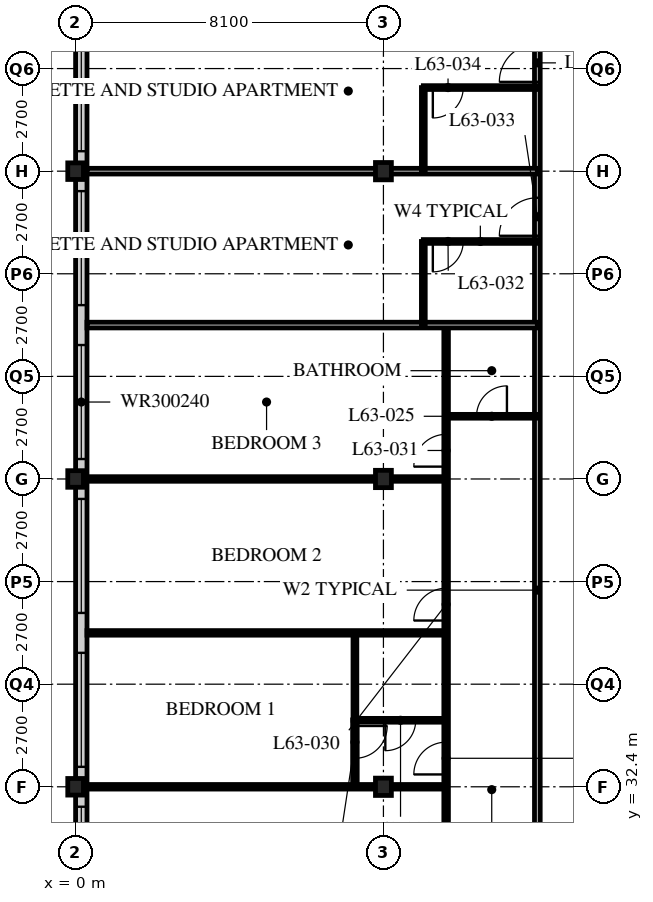
"""IFC4 building model, lengths in metres.
Left out: names, types, materials, properties, quantities, classifications, styles, units other than length and angle.
Written with IfcOpenShell. Run it as: python <this file> out.ifc"""

import sys

from ifc_helpers import new_model, si_unit, direction, frame, frame_2d, origin, origin_2d, place, context, subcontext, project, spatial, rectangle, i_section, extrude, element, fill, save


model = new_model("IFC4")
c1 = context("Model", 3, precision=1e-05, world=origin(), true_north=direction((0.0, 1.0)))
c2 = subcontext(c1, "Body", "Model", "MODEL_VIEW")
j1 = project(units=[si_unit("LENGTHUNIT", "METRE"), si_unit("PLANEANGLEUNIT", "RADIAN")], contexts=[c1])
p1 = place(None, origin())
s1 = spatial("IfcSite", under=j1, at=p1, CompositionType="ELEMENT")
p2 = place(p1, origin())
s2 = spatial("IfcBuilding", under=s1, at=p2, CompositionType="ELEMENT")
p3 = place(p2, frame((0.0, 0.0, 246.3)))
s3 = spatial("IfcBuildingStorey", under=s2, at=p3, CompositionType="ELEMENT", Elevation=246.3)
for number, where, z_axis, x_axis in (
    (1, (0.0, 32.4, 0.0), (0.0, 0.0, 1.0), (1.0, 0.0, 0.0)),
    (2, (0.0, 40.5, 0.0), (0.0, 0.0, 1.0), (1.0, 0.0, 0.0)),
    (3, (0.0, 48.6, 0.0), (0.0, 0.0, 1.0), (1.0, 0.0, 0.0)),
):
    element("IfcColumn", number, at=place(p3, frame(where, z_axis=z_axis, x_axis=x_axis)), inside=s3, PredefinedType="COLUMN", context=c2, shape_type="SweptSolid", body=[
        extrude(i_section(OverallWidth=0.412, OverallDepth=0.437, WebThickness=0.036, FlangeThickness=0.058, FilletRadius=0.015, at=origin_2d()), origin(), (0.0, 0.0, 1.0), 3.9),
    ])
for number, where, z_axis, x_axis in (
    (4, (8.1, 32.4, 0.0), (0.0, 0.0, 1.0), (1.0, 0.0, 0.0)),
    (5, (8.1, 40.5, 0.0), (0.0, 0.0, 1.0), (1.0, 0.0, 0.0)),
    (6, (8.1, 48.6, 0.0), (0.0, 0.0, 1.0), (1.0, 0.0, 0.0)),
):
    element("IfcColumn", number, at=place(p3, frame(where, z_axis=z_axis, x_axis=x_axis)), inside=s3, PredefinedType="COLUMN", context=c2, shape_type="SweptSolid", body=[
        extrude(i_section(OverallWidth=0.418, OverallDepth=0.456, WebThickness=0.042, FlangeThickness=0.067, FilletRadius=0.015, at=origin_2d()), origin(), (0.0, 0.0, 1.0), 3.9),
    ])
p4 = place(p3, frame((0.15, 56.4, 0.0), z_axis=(0.0, 0.0, 1.0), x_axis=(0.0, -1.0, 0.0)))
e7 = element("IfcWall", 7, at=p4, inside=s3, PredefinedType="SOLIDWALL", context=c2, shape_type="SweptSolid", body=[
    extrude(rectangle(XDim=32.1, YDim=0.3, at=frame_2d((16.05, 0.0))), origin(), (0.0, 0.0, 1.0), 3.69),
])
p5 = place(p4, frame((0.225, 0.0, 0.6)))
e8 = element("IfcOpeningElement", 8, at=p5, cuts=e7, PredefinedType="OPENING", context=c2, shape_type="SweptSolid", body=[
    extrude(rectangle(XDim=3.0, YDim=2.4, at=frame_2d((1.5, 1.2))), frame((0.0, 0.16, 0.0), z_axis=(0.0, -1.0, 0.0), x_axis=(1.0, 0.0, 0.0)), (0.0, 0.0, 1.0), 0.32),
])
p6 = place(p4, frame((4.275, 0.0, 0.6)))
e9 = element("IfcOpeningElement", 9, at=p6, cuts=e7, PredefinedType="OPENING", context=c2, shape_type="SweptSolid", body=[
    extrude(rectangle(XDim=3.0, YDim=2.4, at=frame_2d((1.5, 1.2))), frame((0.0, 0.16, 0.0), z_axis=(0.0, -1.0, 0.0), x_axis=(1.0, 0.0, 0.0)), (0.0, 0.0, 1.0), 0.32),
])
p7 = place(p4, frame((8.325, 0.0, 0.6)))
e10 = element("IfcOpeningElement", 10, at=p7, cuts=e7, PredefinedType="OPENING", context=c2, shape_type="SweptSolid", body=[
    extrude(rectangle(XDim=3.0, YDim=2.4, at=frame_2d((1.5, 1.2))), frame((0.0, 0.16, 0.0), z_axis=(0.0, -1.0, 0.0), x_axis=(1.0, 0.0, 0.0)), (0.0, 0.0, 1.0), 0.32),
])
p8 = place(p4, frame((12.375, 0.0, 0.6)))
e11 = element("IfcOpeningElement", 11, at=p8, cuts=e7, PredefinedType="OPENING", context=c2, shape_type="SweptSolid", body=[
    extrude(rectangle(XDim=3.0, YDim=2.4, at=frame_2d((1.5, 1.2))), frame((0.0, 0.16, 0.0), z_axis=(0.0, -1.0, 0.0), x_axis=(1.0, 0.0, 0.0)), (0.0, 0.0, 1.0), 0.32),
])
p9 = place(p4, frame((16.425, 0.0, 0.6)))
e12 = element("IfcOpeningElement", 12, at=p9, cuts=e7, PredefinedType="OPENING", context=c2, shape_type="SweptSolid", body=[
    extrude(rectangle(XDim=3.0, YDim=2.4, at=frame_2d((1.5, 1.2))), frame((0.0, 0.16, 0.0), z_axis=(0.0, -1.0, 0.0), x_axis=(1.0, 0.0, 0.0)), (0.0, 0.0, 1.0), 0.32),
])
p10 = place(p4, frame((20.475, 0.0, 0.6)))
e13 = element("IfcOpeningElement", 13, at=p10, cuts=e7, PredefinedType="OPENING", context=c2, shape_type="SweptSolid", body=[
    extrude(rectangle(XDim=3.0, YDim=2.4, at=frame_2d((1.5, 1.2))), frame((0.0, 0.16, 0.0), z_axis=(0.0, -1.0, 0.0), x_axis=(1.0, 0.0, 0.0)), (0.0, 0.0, 1.0), 0.32),
])
p11 = place(p4, frame((24.525, 0.0, 0.6)))
e14 = element("IfcOpeningElement", 14, at=p11, cuts=e7, PredefinedType="OPENING", context=c2, shape_type="SweptSolid", body=[
    extrude(rectangle(XDim=3.0, YDim=2.4, at=frame_2d((1.5, 1.2))), frame((0.0, 0.16, 0.0), z_axis=(0.0, -1.0, 0.0), x_axis=(1.0, 0.0, 0.0)), (0.0, 0.0, 1.0), 0.32),
])
p12 = place(p4, frame((28.575, 0.0, 0.6)))
e15 = element("IfcOpeningElement", 15, at=p12, cuts=e7, PredefinedType="OPENING", context=c2, shape_type="SweptSolid", body=[
    extrude(rectangle(XDim=3.0, YDim=2.4, at=frame_2d((1.5, 1.2))), frame((0.0, 0.16, 0.0), z_axis=(0.0, -1.0, 0.0), x_axis=(1.0, 0.0, 0.0)), (0.0, 0.0, 1.0), 0.32),
])
p13 = place(p3, frame((12.15, 22.5, 0.0), z_axis=(0.0, 0.0, 1.0), x_axis=(0.0, 1.0, 0.0)))
e16 = element("IfcWall", 16, at=p13, inside=s3, PredefinedType="PARTITIONING", context=c2, shape_type="SweptSolid", body=[
    extrude(rectangle(XDim=30.15, YDim=0.15, at=frame_2d((15.075, 0.0))), origin(), (0.0, 0.0, 1.0), 3.69),
])
p14 = place(p13, frame((0.4, 0.0, 0.0)))
e17 = element("IfcOpeningElement", 17, at=p14, cuts=e16, PredefinedType="OPENING", context=c2, shape_type="SweptSolid", body=[
    extrude(rectangle(XDim=1.0, YDim=2.1, at=frame_2d((0.5, 1.05))), frame((0.0, 0.085, 0.0), z_axis=(0.0, -1.0, 0.0), x_axis=(1.0, 0.0, 0.0)), (0.0, 0.0, 1.0), 0.17),
])
p15 = place(p13, frame((24.4, 0.0, 0.0)))
e18 = element("IfcOpeningElement", 18, at=p15, cuts=e16, PredefinedType="OPENING", context=c2, shape_type="SweptSolid", body=[
    extrude(rectangle(XDim=1.0, YDim=2.1, at=frame_2d((0.5, 1.05))), frame((0.0, 0.085, 0.0), z_axis=(0.0, -1.0, 0.0), x_axis=(1.0, 0.0, 0.0)), (0.0, 0.0, 1.0), 0.17),
])
p16 = place(p13, frame((28.45, 0.0, 0.0)))
e19 = element("IfcOpeningElement", 19, at=p16, cuts=e16, PredefinedType="OPENING", context=c2, shape_type="SweptSolid", body=[
    extrude(rectangle(XDim=1.0, YDim=2.1, at=frame_2d((0.5, 1.05))), frame((0.0, 0.085, 0.0), z_axis=(0.0, -1.0, 0.0), x_axis=(1.0, 0.0, 0.0)), (0.0, 0.0, 1.0), 0.17),
])
p17 = place(p3, frame((9.75, 22.5, 0.0), z_axis=(0.0, 0.0, 1.0), x_axis=(0.0, 1.0, 0.0)))
e20 = element("IfcWall", 20, at=p17, inside=s3, PredefinedType="PARTITIONING", context=c2, shape_type="SweptSolid", body=[
    extrude(rectangle(XDim=22.05, YDim=0.12, at=frame_2d((11.025, 0.0))), origin(), (0.0, 0.0, 1.0), 3.69),
])
p18 = place(p17, frame((0.975, 0.0, 0.0)))
e21 = element("IfcOpeningElement", 21, at=p18, cuts=e20, PredefinedType="OPENING", context=c2, shape_type="SweptSolid", body=[
    extrude(rectangle(XDim=0.85, YDim=2.1, at=frame_2d((0.425, 1.05))), frame((0.0, 0.07, 0.0), z_axis=(0.0, -1.0, 0.0), x_axis=(1.0, 0.0, 0.0)), (0.0, 0.0, 1.0), 0.14),
])
p19 = place(p17, frame((10.225, 0.0, 0.0)))
e22 = element("IfcOpeningElement", 22, at=p19, cuts=e20, PredefinedType="OPENING", context=c2, shape_type="SweptSolid", body=[
    extrude(rectangle(XDim=0.85, YDim=2.1, at=frame_2d((0.425, 1.05))), frame((0.0, 0.07, 0.0), z_axis=(0.0, -1.0, 0.0), x_axis=(1.0, 0.0, 0.0)), (0.0, 0.0, 1.0), 0.14),
])
p20 = place(p17, frame((14.275, 0.0, 0.0)))
e23 = element("IfcOpeningElement", 23, at=p20, cuts=e20, PredefinedType="OPENING", context=c2, shape_type="SweptSolid", body=[
    extrude(rectangle(XDim=0.85, YDim=2.1, at=frame_2d((0.425, 1.05))), frame((0.0, 0.07, 0.0), z_axis=(0.0, -1.0, 0.0), x_axis=(1.0, 0.0, 0.0)), (0.0, 0.0, 1.0), 0.14),
])
p21 = place(p17, frame((18.325, 0.0, 0.0)))
e24 = element("IfcOpeningElement", 24, at=p21, cuts=e20, PredefinedType="OPENING", context=c2, shape_type="SweptSolid", body=[
    extrude(rectangle(XDim=0.85, YDim=2.1, at=frame_2d((0.425, 1.05))), frame((0.0, 0.07, 0.0), z_axis=(0.0, -1.0, 0.0), x_axis=(1.0, 0.0, 0.0)), (0.0, 0.0, 1.0), 0.14),
])
p22 = place(p3, frame((12.15, 42.15, 0.0), z_axis=(0.0, 0.0, 1.0), x_axis=(-1.0, 0.0, 0.0)))
e25 = element("IfcWall", 25, at=p22, inside=s3, PredefinedType="PARTITIONING", context=c2, shape_type="SweptSolid", body=[
    extrude(rectangle(XDim=2.4, YDim=0.1, at=frame_2d((1.2, 0.0))), origin(), (0.0, 0.0, 1.0), 3.69),
])
p23 = place(p22, frame((0.8, 0.0, 0.0)))
e26 = element("IfcOpeningElement", 26, at=p23, cuts=e25, PredefinedType="OPENING", context=c2, shape_type="SweptSolid", body=[
    extrude(rectangle(XDim=0.8, YDim=2.1, at=frame_2d((0.4, 1.05))), frame((0.0, 0.06, 0.0), z_axis=(0.0, -1.0, 0.0), x_axis=(1.0, 0.0, 0.0)), (0.0, 0.0, 1.0), 0.12),
])
p24 = place(p3, frame((9.75, 34.15, 0.0), z_axis=(0.0, 0.0, 1.0), x_axis=(-1.0, 0.0, 0.0)))
e27 = element("IfcWall", 27, at=p24, inside=s3, PredefinedType="PARTITIONING", context=c2, shape_type="SweptSolid", body=[
    extrude(rectangle(XDim=2.4, YDim=0.1, at=frame_2d((1.2, 0.0))), origin(), (0.0, 0.0, 1.0), 3.69),
])
p25 = place(p24, frame((0.8, 0.0, 0.0)))
e28 = element("IfcOpeningElement", 28, at=p25, cuts=e27, PredefinedType="OPENING", context=c2, shape_type="SweptSolid", body=[
    extrude(rectangle(XDim=0.8, YDim=2.1, at=frame_2d((0.4, 1.05))), frame((0.0, 0.06, 0.0), z_axis=(0.0, -1.0, 0.0), x_axis=(1.0, 0.0, 0.0)), (0.0, 0.0, 1.0), 0.12),
])
p26 = place(p3, frame((7.35, 34.15, 0.0), z_axis=(0.0, 0.0, 1.0), x_axis=(0.0, 1.0, 0.0)))
e29 = element("IfcWall", 29, at=p26, inside=s3, PredefinedType="PARTITIONING", context=c2, shape_type="SweptSolid", body=[
    extrude(rectangle(XDim=2.3, YDim=0.1, at=frame_2d((1.15, 0.0))), origin(), (0.0, 0.0, 1.0), 3.69),
])
p27 = place(p3, frame((9.75, 32.4, 0.0), z_axis=(0.0, 0.0, 1.0), x_axis=(-1.0, 0.0, 0.0)))
e30 = element("IfcWall", 30, at=p27, inside=s3, PredefinedType="PARTITIONING", context=c2, shape_type="SweptSolid", body=[
    extrude(rectangle(XDim=9.45, YDim=0.12, at=frame_2d((4.725, 0.0))), origin(), (0.0, 0.0, 1.0), 3.078),
])
p28 = place(p3, frame((9.75, 36.45, 0.0), z_axis=(0.0, 0.0, 1.0), x_axis=(-1.0, 0.0, 0.0)))
e31 = element("IfcWall", 31, at=p28, inside=s3, PredefinedType="PARTITIONING", context=c2, shape_type="SweptSolid", body=[
    extrude(rectangle(XDim=9.45, YDim=0.12, at=frame_2d((4.725, 0.0))), origin(), (0.0, 0.0, 1.0), 3.69),
])
p29 = place(p3, frame((9.75, 40.5, 0.0), z_axis=(0.0, 0.0, 1.0), x_axis=(-1.0, 0.0, 0.0)))
e32 = element("IfcWall", 32, at=p29, inside=s3, PredefinedType="PARTITIONING", context=c2, shape_type="SweptSolid", body=[
    extrude(rectangle(XDim=9.45, YDim=0.12, at=frame_2d((4.725, 0.0))), origin(), (0.0, 0.0, 1.0), 3.078),
])
p30 = place(p3, frame((12.15, 44.55, 0.0), z_axis=(0.0, 0.0, 1.0), x_axis=(-1.0, 0.0, 0.0)))
e33 = element("IfcWall", 33, at=p30, inside=s3, PredefinedType="PARTITIONING", context=c2, shape_type="SweptSolid", body=[
    extrude(rectangle(XDim=11.85, YDim=0.15, at=frame_2d((5.925, 0.0))), origin(), (0.0, 0.0, 1.0), 3.69),
])
p31 = place(p3, frame((9.15, 44.55, 0.0), z_axis=(0.0, 0.0, 1.0), x_axis=(0.0, 1.0, 0.0)))
e34 = element("IfcWall", 34, at=p31, inside=s3, PredefinedType="PARTITIONING", context=c2, shape_type="SweptSolid", body=[
    extrude(rectangle(XDim=2.2, YDim=0.1, at=frame_2d((1.1, 0.0))), origin(), (0.0, 0.0, 1.0), 3.69),
])
p32 = place(p3, frame((12.15, 46.75, 0.0), z_axis=(0.0, 0.0, 1.0), x_axis=(-1.0, 0.0, 0.0)))
e35 = element("IfcWall", 35, at=p32, inside=s3, PredefinedType="PARTITIONING", context=c2, shape_type="SweptSolid", body=[
    extrude(rectangle(XDim=3.0, YDim=0.1, at=frame_2d((1.5, 0.0))), origin(), (0.0, 0.0, 1.0), 3.69),
])
p33 = place(p32, frame((1.95, 0.0, 0.0)))
e36 = element("IfcOpeningElement", 36, at=p33, cuts=e35, PredefinedType="OPENING", context=c2, shape_type="SweptSolid", body=[
    extrude(rectangle(XDim=0.8, YDim=2.1, at=frame_2d((0.4, 1.05))), frame((0.0, 0.06, 0.0), z_axis=(0.0, -1.0, 0.0), x_axis=(1.0, 0.0, 0.0)), (0.0, 0.0, 1.0), 0.12),
])
p34 = place(p3, frame((12.15, 48.6, 0.0), z_axis=(0.0, 0.0, 1.0), x_axis=(-1.0, 0.0, 0.0)))
e37 = element("IfcWall", 37, at=p34, inside=s3, PredefinedType="PARTITIONING", context=c2, shape_type="SweptSolid", body=[
    extrude(rectangle(XDim=11.85, YDim=0.15, at=frame_2d((5.925, 0.0))), origin(), (0.0, 0.0, 1.0), 3.078),
])
p35 = place(p3, frame((9.15, 48.6, 0.0), z_axis=(0.0, 0.0, 1.0), x_axis=(0.0, 1.0, 0.0)))
e38 = element("IfcWall", 38, at=p35, inside=s3, PredefinedType="PARTITIONING", context=c2, shape_type="SweptSolid", body=[
    extrude(rectangle(XDim=2.2, YDim=0.1, at=frame_2d((1.1, 0.0))), origin(), (0.0, 0.0, 1.0), 3.69),
])
p36 = place(p3, frame((12.15, 50.8, 0.0), z_axis=(0.0, 0.0, 1.0), x_axis=(-1.0, 0.0, 0.0)))
e39 = element("IfcWall", 39, at=p36, inside=s3, PredefinedType="PARTITIONING", context=c2, shape_type="SweptSolid", body=[
    extrude(rectangle(XDim=3.0, YDim=0.1, at=frame_2d((1.5, 0.0))), origin(), (0.0, 0.0, 1.0), 3.69),
])
p37 = place(p36, frame((1.95, 0.0, 0.0)))
e40 = element("IfcOpeningElement", 40, at=p37, cuts=e39, PredefinedType="OPENING", context=c2, shape_type="SweptSolid", body=[
    extrude(rectangle(XDim=0.8, YDim=2.1, at=frame_2d((0.4, 1.05))), frame((0.0, 0.06, 0.0), z_axis=(0.0, -1.0, 0.0), x_axis=(1.0, 0.0, 0.0)), (0.0, 0.0, 1.0), 0.12),
])
p38 = place(p3, frame((7.35, 32.4, 0.0), z_axis=(0.0, 0.0, 1.0), x_axis=(0.0, 1.0, 0.0)))
e41 = element("IfcWall", 41, at=p38, inside=s3, PredefinedType="PARTITIONING", context=c2, shape_type="SweptSolid", body=[
    extrude(rectangle(XDim=1.76, YDim=0.12, at=frame_2d((0.88, 0.0))), origin(), (0.0, 0.0, 1.0), 3.69),
])
p39 = place(p38, frame((0.75, 0.0, 0.0)))
e42 = element("IfcOpeningElement", 42, at=p39, cuts=e41, PredefinedType="OPENING", context=c2, shape_type="SweptSolid", body=[
    extrude(rectangle(XDim=0.85, YDim=2.1, at=frame_2d((0.425, 1.05))), frame((0.0, 0.07, 0.0), z_axis=(0.0, -1.0, 0.0), x_axis=(1.0, 0.0, 0.0)), (0.0, 0.0, 1.0), 0.14),
])
p40 = place(p6, origin())
e43 = element("IfcWindow", 43, at=p40, inside=s3, PartitioningType="SINGLE_PANEL", PredefinedType="WINDOW", context=c2, shape_type="SweptSolid", body=[
    extrude(rectangle(XDim=3.0, YDim=2.4, at=frame_2d((1.5, 1.2))), frame((0.0, 0.03, 0.0), z_axis=(0.0, -1.0, 0.0), x_axis=(1.0, 0.0, 0.0)), (0.0, 0.0, 1.0), 0.06),
])
fill(e9, e43)
p41 = place(p7, origin())
e44 = element("IfcWindow", 44, at=p41, inside=s3, PartitioningType="SINGLE_PANEL", PredefinedType="WINDOW", context=c2, shape_type="SweptSolid", body=[
    extrude(rectangle(XDim=3.0, YDim=2.4, at=frame_2d((1.5, 1.2))), frame((0.0, 0.03, 0.0), z_axis=(0.0, -1.0, 0.0), x_axis=(1.0, 0.0, 0.0)), (0.0, 0.0, 1.0), 0.06),
])
fill(e10, e44)
p42 = place(p8, origin())
e45 = element("IfcWindow", 45, at=p42, inside=s3, PartitioningType="SINGLE_PANEL", PredefinedType="WINDOW", context=c2, shape_type="SweptSolid", body=[
    extrude(rectangle(XDim=3.0, YDim=2.4, at=frame_2d((1.5, 1.2))), frame((0.0, 0.03, 0.0), z_axis=(0.0, -1.0, 0.0), x_axis=(1.0, 0.0, 0.0)), (0.0, 0.0, 1.0), 0.06),
])
fill(e11, e45)
p43 = place(p9, origin())
e46 = element("IfcWindow", 46, at=p43, inside=s3, PartitioningType="SINGLE_PANEL", PredefinedType="WINDOW", context=c2, shape_type="SweptSolid", body=[
    extrude(rectangle(XDim=3.0, YDim=2.4, at=frame_2d((1.5, 1.2))), frame((0.0, 0.03, 0.0), z_axis=(0.0, -1.0, 0.0), x_axis=(1.0, 0.0, 0.0)), (0.0, 0.0, 1.0), 0.06),
])
fill(e12, e46)
p44 = place(p10, origin())
e47 = element("IfcWindow", 47, at=p44, inside=s3, PartitioningType="SINGLE_PANEL", PredefinedType="WINDOW", context=c2, shape_type="SweptSolid", body=[
    extrude(rectangle(XDim=3.0, YDim=2.4, at=frame_2d((1.5, 1.2))), frame((0.0, 0.03, 0.0), z_axis=(0.0, -1.0, 0.0), x_axis=(1.0, 0.0, 0.0)), (0.0, 0.0, 1.0), 0.06),
])
fill(e13, e47)
p45 = place(p11, origin())
e48 = element("IfcWindow", 48, at=p45, inside=s3, PartitioningType="SINGLE_PANEL", PredefinedType="WINDOW", context=c2, shape_type="SweptSolid", body=[
    extrude(rectangle(XDim=3.0, YDim=2.4, at=frame_2d((1.5, 1.2))), frame((0.0, 0.03, 0.0), z_axis=(0.0, -1.0, 0.0), x_axis=(1.0, 0.0, 0.0)), (0.0, 0.0, 1.0), 0.06),
])
fill(e14, e48)
p46 = place(p23, origin())
e49 = element("IfcDoor", 49, at=p46, inside=s3, OperationType="SINGLE_SWING_RIGHT", PredefinedType="DOOR", context=c2, shape_type="SweptSolid", body=[
    extrude(rectangle(XDim=0.8, YDim=2.1, at=frame_2d((0.4, 1.05))), frame((0.0, 0.025, 0.0), z_axis=(0.0, -1.0, 0.0), x_axis=(1.0, 0.0, 0.0)), (0.0, 0.0, 1.0), 0.05),
])
fill(e26, e49)
p47 = place(p25, origin())
e50 = element("IfcDoor", 50, at=p47, inside=s3, OperationType="SINGLE_SWING_RIGHT", PredefinedType="DOOR", context=c2, shape_type="SweptSolid", body=[
    extrude(rectangle(XDim=0.8, YDim=2.1, at=frame_2d((0.4, 1.05))), frame((0.0, 0.025, 0.0), z_axis=(0.0, -1.0, 0.0), x_axis=(1.0, 0.0, 0.0)), (0.0, 0.0, 1.0), 0.05),
])
fill(e28, e50)
p48 = place(p19, origin())
e51 = element("IfcDoor", 51, at=p48, inside=s3, OperationType="SINGLE_SWING_LEFT", PredefinedType="DOOR", context=c2, shape_type="SweptSolid", body=[
    extrude(rectangle(XDim=0.85, YDim=2.1, at=frame_2d((0.425, 1.05))), frame((0.0, 0.025, 0.0), z_axis=(0.0, -1.0, 0.0), x_axis=(1.0, 0.0, 0.0)), (0.0, 0.0, 1.0), 0.05),
])
fill(e22, e51)
p49 = place(p20, origin())
e52 = element("IfcDoor", 52, at=p49, inside=s3, OperationType="SINGLE_SWING_LEFT", PredefinedType="DOOR", context=c2, shape_type="SweptSolid", body=[
    extrude(rectangle(XDim=0.85, YDim=2.1, at=frame_2d((0.425, 1.05))), frame((0.0, 0.025, 0.0), z_axis=(0.0, -1.0, 0.0), x_axis=(1.0, 0.0, 0.0)), (0.0, 0.0, 1.0), 0.05),
])
fill(e23, e52)
p50 = place(p21, origin())
e53 = element("IfcDoor", 53, at=p50, inside=s3, OperationType="SINGLE_SWING_LEFT", PredefinedType="DOOR", context=c2, shape_type="SweptSolid", body=[
    extrude(rectangle(XDim=0.85, YDim=2.1, at=frame_2d((0.425, 1.05))), frame((0.0, 0.025, 0.0), z_axis=(0.0, -1.0, 0.0), x_axis=(1.0, 0.0, 0.0)), (0.0, 0.0, 1.0), 0.05),
])
fill(e24, e53)
p51 = place(p33, origin())
e54 = element("IfcDoor", 54, at=p51, inside=s3, OperationType="SINGLE_SWING_RIGHT", PredefinedType="DOOR", context=c2, shape_type="SweptSolid", body=[
    extrude(rectangle(XDim=0.8, YDim=2.1, at=frame_2d((0.4, 1.05))), frame((0.0, 0.025, 0.0), z_axis=(0.0, -1.0, 0.0), x_axis=(1.0, 0.0, 0.0)), (0.0, 0.0, 1.0), 0.05),
])
fill(e36, e54)
p52 = place(p15, origin())
e55 = element("IfcDoor", 55, at=p52, inside=s3, OperationType="SINGLE_SWING_LEFT", PredefinedType="DOOR", context=c2, shape_type="SweptSolid", body=[
    extrude(rectangle(XDim=1.0, YDim=2.1, at=frame_2d((0.5, 1.05))), frame((0.0, 0.025, 0.0), z_axis=(0.0, -1.0, 0.0), x_axis=(1.0, 0.0, 0.0)), (0.0, 0.0, 1.0), 0.05),
])
fill(e18, e55)
p53 = place(p37, origin())
e56 = element("IfcDoor", 56, at=p53, inside=s3, OperationType="SINGLE_SWING_RIGHT", PredefinedType="DOOR", context=c2, shape_type="SweptSolid", body=[
    extrude(rectangle(XDim=0.8, YDim=2.1, at=frame_2d((0.4, 1.05))), frame((0.0, 0.025, 0.0), z_axis=(0.0, -1.0, 0.0), x_axis=(1.0, 0.0, 0.0)), (0.0, 0.0, 1.0), 0.05),
])
fill(e40, e56)
p54 = place(p16, origin())
e57 = element("IfcDoor", 57, at=p54, inside=s3, OperationType="SINGLE_SWING_LEFT", PredefinedType="DOOR", context=c2, shape_type="SweptSolid", body=[
    extrude(rectangle(XDim=1.0, YDim=2.1, at=frame_2d((0.5, 1.05))), frame((0.0, 0.025, 0.0), z_axis=(0.0, -1.0, 0.0), x_axis=(1.0, 0.0, 0.0)), (0.0, 0.0, 1.0), 0.05),
])
fill(e19, e57)
p55 = place(p39, origin())
e58 = element("IfcDoor", 58, at=p55, inside=s3, OperationType="SINGLE_SWING_LEFT", PredefinedType="DOOR", context=c2, shape_type="SweptSolid", body=[
    extrude(rectangle(XDim=0.85, YDim=2.1, at=frame_2d((0.425, 1.05))), frame((0.0, 0.025, 0.0), z_axis=(0.0, -1.0, 0.0), x_axis=(1.0, 0.0, 0.0)), (0.0, 0.0, 1.0), 0.05),
])
fill(e42, e58)
save(model, sys.argv[1])
